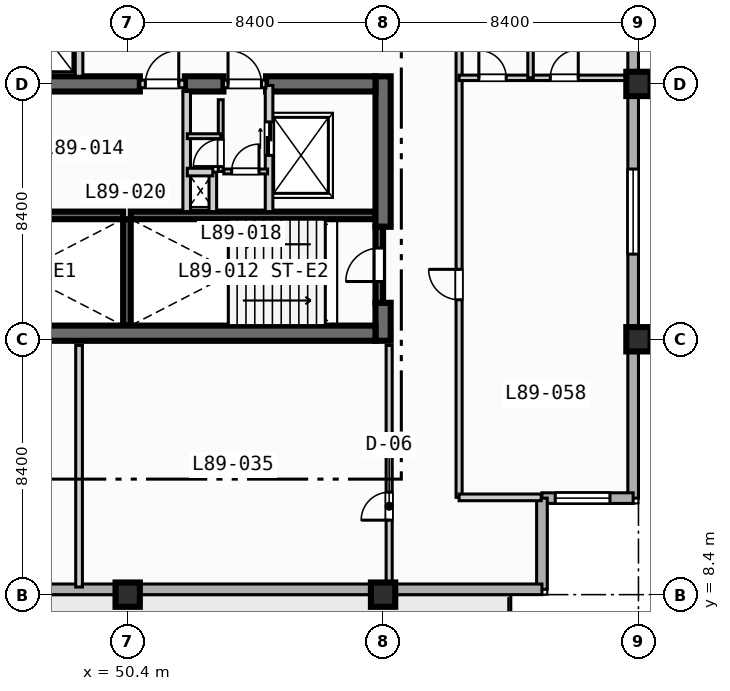
"""IFC4 building model, lengths in metres.
Left out: names, types, materials, properties, quantities, classifications, styles, units other than length and angle.
Written with IfcOpenShell. Run it as: python <this file> out.ifc"""

import sys

from ifc_helpers import new_model, si_unit, direction, frame, frame_2d, origin, origin_2d, place, context, subcontext, project, spatial, rectangle, extrude, element, fill, save


model = new_model("IFC4")
c1 = context("Model", 3, precision=1e-05, world=origin(), true_north=direction((0.0, 1.0)))
c2 = subcontext(c1, "Body", "Model", "MODEL_VIEW")
j1 = project(units=[si_unit("LENGTHUNIT", "METRE"), si_unit("PLANEANGLEUNIT", "RADIAN")], contexts=[c1])
p1 = place(None, origin())
s1 = spatial("IfcSite", under=j1, at=p1, CompositionType="ELEMENT")
p2 = place(p1, origin())
s2 = spatial("IfcBuilding", under=s1, at=p2, CompositionType="ELEMENT")
p3 = place(p2, frame((0.0, 0.0, 359.6)))
s3 = spatial("IfcBuildingStorey", under=s2, at=p3, CompositionType="ELEMENT", Elevation=359.6)
for number, where, z_axis, x_axis in (
    (1, (42.2, 20.875, 0.0), (0.0, 0.0, 1.0), (1.0, 0.0, 0.0)),
    (2, (50.5, 20.875, 0.0), (0.0, 0.0, 1.0), (1.0, 0.0, 0.0)),
):
    element("IfcWall", number, at=place(p3, frame(where, z_axis=z_axis, x_axis=x_axis)), inside=s3, PredefinedType="SOLIDWALL", context=c2, shape_type="SweptSolid", body=[
        extrude(rectangle(XDim=8.05, YDim=0.25, at=frame_2d((4.025, 0.0))), origin(), (0.0, 0.0, 1.0), 3.9),
    ])
p4 = place(p3, frame((50.375, 17.25, 0.0), z_axis=(0.0, 0.0, 1.0), x_axis=(0.0, 1.0, 0.0)))
e3 = element("IfcWall", 3, at=p4, inside=s3, PredefinedType="SOLIDWALL", context=c2, shape_type="SweptSolid", body=[
    extrude(rectangle(XDim=3.5, YDim=0.25, at=frame_2d((1.75, 0.0))), origin(), (0.0, 0.0, 1.0), 3.9),
])
p5 = place(p3, frame((58.8, 16.75, 0.0), z_axis=(0.0, 0.0, 1.0), x_axis=(0.0, 1.0, 0.0)))
e4 = element("IfcWall", 4, at=p5, inside=s3, PredefinedType="SHEAR", context=c2, shape_type="SweptSolid", body=[
    extrude(rectangle(XDim=1.25, YDim=0.5, at=frame_2d((0.625, 0.0))), origin(), (0.0, 0.0, 1.0), 3.9),
])
p6 = place(p3, frame((58.8, 20.5, 0.0), z_axis=(0.0, 0.0, 1.0), x_axis=(0.0, 1.0, 0.0)))
e5 = element("IfcWall", 5, at=p6, inside=s3, PredefinedType="SHEAR", context=c2, shape_type="SweptSolid", body=[
    extrude(rectangle(XDim=4.95, YDim=0.5, at=frame_2d((2.475, 0.0))), origin(), (0.0, 0.0, 1.0), 3.9),
])
p7 = place(p3, frame((42.2, 17.0, 0.0), z_axis=(0.0, 0.0, 1.0), x_axis=(1.0, 0.0, 0.0)))
e6 = element("IfcWall", 6, at=p7, inside=s3, PredefinedType="SHEAR", context=c2, shape_type="SweptSolid", body=[
    extrude(rectangle(XDim=16.35, YDim=0.5, at=frame_2d((8.175, 0.0))), origin(), (0.0, 0.0, 1.0), 3.9),
])
p8 = place(p3, frame((42.2, 25.2, 0.0), z_axis=(0.0, 0.0, 1.0), x_axis=(1.0, 0.0, 0.0)))
e7 = element("IfcWall", 7, at=p8, inside=s3, PredefinedType="SHEAR", context=c2, shape_type="SweptSolid", body=[
    extrude(rectangle(XDim=8.6, YDim=0.5, at=frame_2d((4.3, 0.0))), origin(), (0.0, 0.0, 1.0), 3.9),
])
p9 = place(p3, frame((52.28, 25.2, 0.0), z_axis=(0.0, 0.0, 1.0), x_axis=(1.0, 0.0, 0.0)))
e8 = element("IfcWall", 8, at=p9, inside=s3, PredefinedType="SHEAR", context=c2, shape_type="SweptSolid", body=[
    extrude(rectangle(XDim=1.27, YDim=0.5, at=frame_2d((0.635, 0.0))), origin(), (0.0, 0.0, 1.0), 3.9),
])
p10 = place(p3, frame((54.95, 25.2, 0.0), z_axis=(0.0, 0.0, 1.0), x_axis=(1.0, 0.0, 0.0)))
e9 = element("IfcWall", 9, at=p10, inside=s3, PredefinedType="SHEAR", context=c2, shape_type="SweptSolid", body=[
    extrude(rectangle(XDim=3.6, YDim=0.5, at=frame_2d((1.8, 0.0))), origin(), (0.0, 0.0, 1.0), 3.9),
])
for number, where, z_axis, x_axis in (
    (10, (50.4, 8.4, 0.0), (0.0, 0.0, 1.0), (1.0, 0.0, 0.0)),
    (11, (58.8, 8.4, 0.0), (0.0, 0.0, 1.0), (1.0, 0.0, 0.0)),
    (12, (67.2, 16.8, 0.0), (0.0, 0.0, 1.0), (1.0, 0.0, 0.0)),
    (13, (67.2, 25.2, 0.0), (0.0, 0.0, 1.0), (1.0, 0.0, 0.0)),
):
    element("IfcColumn", number, at=place(p3, frame(where, z_axis=z_axis, x_axis=x_axis)), inside=s3, PredefinedType="COLUMN", context=c2, shape_type="SweptSolid", body=[
        extrude(rectangle(XDim=0.8, YDim=0.8, at=origin_2d()), origin(), (0.0, 0.0, 1.0), 4.2),
    ])
p11 = place(p3, frame((67.025, 30.425, 0.0), z_axis=(0.0, 0.0, 1.0), x_axis=(0.0, -1.0, 0.0)))
e14 = element("IfcWall", 14, at=p11, inside=s3, PredefinedType="STANDARD", context=c2, shape_type="SweptSolid", body=[
    extrude(rectangle(XDim=18.85, YDim=0.35, at=frame_2d((9.425, 0.0))), origin(), (0.0, 0.0, 1.0), 3.3),
])
p12 = place(p11, frame((8.025, 0.0, 0.85)))
e15 = element("IfcOpeningElement", 15, at=p12, cuts=e14, PredefinedType="OPENING", context=c2, shape_type="SweptSolid", body=[
    extrude(rectangle(XDim=2.8, YDim=2.1, at=frame_2d((1.4, 1.05))), frame((0.0, 0.185, 0.0), z_axis=(0.0, -1.0, 0.0), x_axis=(1.0, 0.0, 0.0)), (0.0, 0.0, 1.0), 0.37),
])
p13 = place(p3, frame((67.025, 11.575, 0.0), z_axis=(0.0, 0.0, 1.0), x_axis=(-1.0, 0.0, 0.0)))
e16 = element("IfcWall", 16, at=p13, inside=s3, PredefinedType="STANDARD", context=c2, shape_type="SweptSolid", body=[
    extrude(rectangle(XDim=3.0, YDim=0.35, at=frame_2d((1.5, 0.0))), origin(), (0.0, 0.0, 1.0), 3.9),
])
p14 = place(p13, frame((0.762, 0.0, 0.85)))
e17 = element("IfcOpeningElement", 17, at=p14, cuts=e16, PredefinedType="OPENING", context=c2, shape_type="SweptSolid", body=[
    extrude(rectangle(XDim=1.8, YDim=1.8, at=frame_2d((0.9, 0.9))), frame((0.0, 0.185, 0.0), z_axis=(0.0, -1.0, 0.0), x_axis=(1.0, 0.0, 0.0)), (0.0, 0.0, 1.0), 0.37),
])
p15 = place(p3, frame((64.025, 11.575, 0.0), z_axis=(0.0, 0.0, 1.0), x_axis=(0.0, -1.0, 0.0)))
e18 = element("IfcWall", 18, at=p15, inside=s3, PredefinedType="STANDARD", context=c2, shape_type="SweptSolid", body=[
    extrude(rectangle(XDim=3.0, YDim=0.35, at=frame_2d((1.5, 0.0))), origin(), (0.0, 0.0, 1.0), 3.9),
])
p16 = place(p3, frame((64.025, 8.575, 0.0), z_axis=(0.0, 0.0, 1.0), x_axis=(-1.0, 0.0, 0.0)))
e19 = element("IfcWall", 19, at=p16, inside=s3, PredefinedType="STANDARD", context=c2, shape_type="SweptSolid", body=[
    extrude(rectangle(XDim=52.45, YDim=0.35, at=frame_2d((26.225, 0.0))), origin(), (0.0, 0.0, 1.0), 3.045),
])
p17 = place(p16, frame((34.925, 0.0, 0.0)))
e20 = element("IfcOpeningElement", 20, at=p17, cuts=e19, PredefinedType="OPENING", context=c2, shape_type="SweptSolid", body=[
    extrude(rectangle(XDim=1.4, YDim=2.2, at=frame_2d((0.7, 1.1))), frame((0.0, 0.185, 0.0), z_axis=(0.0, -1.0, 0.0), x_axis=(1.0, 0.0, 0.0)), (0.0, 0.0, 1.0), 0.37),
])
p18 = place(p16, frame((24.825, 0.0, 0.45)))
e21 = element("IfcOpeningElement", 21, at=p18, cuts=e19, PredefinedType="OPENING", context=c2, shape_type="SweptSolid", body=[
    extrude(rectangle(XDim=2.8, YDim=2.1, at=frame_2d((1.4, 1.05))), frame((0.0, 0.185, 0.0), z_axis=(0.0, -1.0, 0.0), x_axis=(1.0, 0.0, 0.0)), (0.0, 0.0, 1.0), 0.37),
])
p19 = place(p16, frame((16.425, 0.0, 0.45)))
e22 = element("IfcOpeningElement", 22, at=p19, cuts=e19, PredefinedType="OPENING", context=c2, shape_type="SweptSolid", body=[
    extrude(rectangle(XDim=2.8, YDim=2.1, at=frame_2d((1.4, 1.05))), frame((0.0, 0.185, 0.0), z_axis=(0.0, -1.0, 0.0), x_axis=(1.0, 0.0, 0.0)), (0.0, 0.0, 1.0), 0.37),
])
p20 = place(p16, frame((50.275, 0.0, 0.85)))
e23 = element("IfcOpeningElement", 23, at=p20, cuts=e19, PredefinedType="OPENING", context=c2, shape_type="SweptSolid", body=[
    extrude(rectangle(XDim=1.8, YDim=1.8, at=frame_2d((0.9, 0.9))), frame((0.0, 0.185, 0.0), z_axis=(0.0, -1.0, 0.0), x_axis=(1.0, 0.0, 0.0)), (0.0, 0.0, 1.0), 0.37),
])
p21 = place(p16, frame((44.875, 0.0, 0.85)))
e24 = element("IfcOpeningElement", 24, at=p21, cuts=e19, PredefinedType="OPENING", context=c2, shape_type="SweptSolid", body=[
    extrude(rectangle(XDim=1.8, YDim=1.8, at=frame_2d((0.9, 0.9))), frame((0.0, 0.185, 0.0), z_axis=(0.0, -1.0, 0.0), x_axis=(1.0, 0.0, 0.0)), (0.0, 0.0, 1.0), 0.37),
])
p22 = place(p16, frame((41.475, 0.0, 0.85)))
e25 = element("IfcOpeningElement", 25, at=p22, cuts=e19, PredefinedType="OPENING", context=c2, shape_type="SweptSolid", body=[
    extrude(rectangle(XDim=1.8, YDim=1.8, at=frame_2d((0.9, 0.9))), frame((0.0, 0.185, 0.0), z_axis=(0.0, -1.0, 0.0), x_axis=(1.0, 0.0, 0.0)), (0.0, 0.0, 1.0), 0.37),
])
p23 = place(p16, frame((32.475, 0.0, 0.85)))
e26 = element("IfcOpeningElement", 26, at=p23, cuts=e19, PredefinedType="OPENING", context=c2, shape_type="SweptSolid", body=[
    extrude(rectangle(XDim=1.8, YDim=1.8, at=frame_2d((0.9, 0.9))), frame((0.0, 0.185, 0.0), z_axis=(0.0, -1.0, 0.0), x_axis=(1.0, 0.0, 0.0)), (0.0, 0.0, 1.0), 0.37),
])
p24 = place(p3, frame((58.675, 18.0, 0.0), z_axis=(0.0, 0.0, 1.0), x_axis=(0.0, 1.0, 0.0)))
e27 = element("IfcWall", 27, at=p24, inside=s3, PredefinedType="SOLIDWALL", context=c2, shape_type="SweptSolid", body=[
    extrude(rectangle(XDim=2.5, YDim=0.25, at=frame_2d((1.25, 0.0))), origin(), (0.0, 0.0, 1.0), 3.9),
])
p25 = place(p24, frame((0.7, 0.0, 0.0)))
e28 = element("IfcOpeningElement", 28, at=p25, cuts=e27, PredefinedType="OPENING", context=c2, shape_type="SweptSolid", body=[
    extrude(rectangle(XDim=1.1, YDim=2.15, at=frame_2d((0.55, 1.075))), frame((0.0, 0.135, 0.0), z_axis=(0.0, -1.0, 0.0), x_axis=(1.0, 0.0, 0.0)), (0.0, 0.0, 1.0), 0.27),
])
p26 = place(p3, frame((50.8, 25.2, 0.0), z_axis=(0.0, 0.0, 1.0), x_axis=(1.0, 0.0, 0.0)))
e29 = element("IfcWall", 29, at=p26, inside=s3, PredefinedType="SOLIDWALL", context=c2, shape_type="SweptSolid", body=[
    extrude(rectangle(XDim=1.48, YDim=0.25, at=frame_2d((0.74, 0.0))), origin(), (0.0, 0.0, 1.0), 3.9),
])
p27 = place(p26, frame((0.18, 0.0, 0.0)))
e30 = element("IfcOpeningElement", 30, at=p27, cuts=e29, PredefinedType="OPENING", context=c2, shape_type="SweptSolid", body=[
    extrude(rectangle(XDim=1.1, YDim=2.15, at=frame_2d((0.55, 1.075))), frame((0.0, 0.135, 0.0), z_axis=(0.0, -1.0, 0.0), x_axis=(1.0, 0.0, 0.0)), (0.0, 0.0, 1.0), 0.27),
])
p28 = place(p3, frame((52.34, 21.0, 0.0), z_axis=(0.0, 0.0, 1.0), x_axis=(0.0, 1.0, 0.0)))
e31 = element("IfcWall", 31, at=p28, inside=s3, PredefinedType="SOLIDWALL", context=c2, shape_type="SweptSolid", body=[
    extrude(rectangle(XDim=3.95, YDim=0.25, at=frame_2d((1.975, 0.0))), origin(), (0.0, 0.0, 1.0), 3.9),
])
p29 = place(p3, frame((55.05, 21.0, 0.0), z_axis=(0.0, 0.0, 1.0), x_axis=(0.0, 1.0, 0.0)))
e32 = element("IfcWall", 32, at=p29, inside=s3, PredefinedType="SOLIDWALL", context=c2, shape_type="SweptSolid", body=[
    extrude(rectangle(XDim=4.15, YDim=0.25, at=frame_2d((2.075, 0.0))), origin(), (0.0, 0.0, 1.0), 3.9),
])
p30 = place(p29, frame((1.85, 0.0, 0.0)))
e33 = element("IfcOpeningElement", 33, at=p30, cuts=e32, PredefinedType="OPENING", context=c2, shape_type="SweptSolid", body=[
    extrude(rectangle(XDim=1.1, YDim=2.15, at=frame_2d((0.55, 1.075))), frame((0.0, 0.135, 0.0), z_axis=(0.0, -1.0, 0.0), x_axis=(1.0, 0.0, 0.0)), (0.0, 0.0, 1.0), 0.27),
])
p31 = place(p3, frame((53.55, 25.2, 0.0), z_axis=(0.0, 0.0, 1.0), x_axis=(1.0, 0.0, 0.0)))
e34 = element("IfcWall", 34, at=p31, inside=s3, PredefinedType="SOLIDWALL", context=c2, shape_type="SweptSolid", body=[
    extrude(rectangle(XDim=1.4, YDim=0.25, at=frame_2d((0.7, 0.0))), origin(), (0.0, 0.0, 1.0), 3.9),
])
p32 = place(p31, frame((0.15, 0.0, 0.0)))
e35 = element("IfcOpeningElement", 35, at=p32, cuts=e34, PredefinedType="OPENING", context=c2, shape_type="SweptSolid", body=[
    extrude(rectangle(XDim=1.1, YDim=2.15, at=frame_2d((0.55, 1.075))), frame((0.0, 0.135, 0.0), z_axis=(0.0, -1.0, 0.0), x_axis=(1.0, 0.0, 0.0)), (0.0, 0.0, 1.0), 0.27),
])
p33 = place(p3, frame((53.2, 21.0, 0.0), z_axis=(0.0, 0.0, 1.0), x_axis=(0.0, 1.0, 0.0)))
e36 = element("IfcWall", 36, at=p33, inside=s3, PredefinedType="SOLIDWALL", context=c2, shape_type="SweptSolid", body=[
    extrude(rectangle(XDim=1.3, YDim=0.25, at=frame_2d((0.65, 0.0))), origin(), (0.0, 0.0, 1.0), 3.9),
])
p34 = place(p3, frame((52.36, 22.3, 0.0), z_axis=(0.0, 0.0, 1.0), x_axis=(1.0, 0.0, 0.0)))
e37 = element("IfcWall", 37, at=p34, inside=s3, PredefinedType="SOLIDWALL", context=c2, shape_type="SweptSolid", body=[
    extrude(rectangle(XDim=0.84, YDim=0.25, at=frame_2d((0.42, 0.0))), origin(), (0.0, 0.0, 1.0), 3.9),
])
p35 = place(p3, frame((53.56, 22.32, 0.0), z_axis=(0.0, 0.0, 1.0), x_axis=(1.0, 0.0, 0.0)))
e38 = element("IfcWall", 38, at=p35, inside=s3, PredefinedType="PARTITIONING", context=c2, shape_type="SweptSolid", body=[
    extrude(rectangle(XDim=1.44, YDim=0.16, at=frame_2d((0.72, 0.0))), origin(), (0.0, 0.0, 1.0), 3.9),
])
p36 = place(p35, frame((0.26, 0.0, 0.0)))
e39 = element("IfcOpeningElement", 39, at=p36, cuts=e38, PredefinedType="OPENING", context=c2, shape_type="SweptSolid", body=[
    extrude(rectangle(XDim=0.9, YDim=2.1, at=frame_2d((0.45, 1.05))), frame((0.0, 0.09, 0.0), z_axis=(0.0, -1.0, 0.0), x_axis=(1.0, 0.0, 0.0)), (0.0, 0.0, 1.0), 0.18),
])
p37 = place(p3, frame((53.46, 22.32, 0.0), z_axis=(0.0, 0.0, 1.0), x_axis=(0.0, 1.0, 0.0)))
e40 = element("IfcWall", 40, at=p37, inside=s3, PredefinedType="PARTITIONING", context=c2, shape_type="SweptSolid", body=[
    extrude(rectangle(XDim=2.36, YDim=0.16, at=frame_2d((1.18, 0.0))), origin(), (0.0, 0.0, 1.0), 3.9),
])
p38 = place(p37, frame((0.16, 0.0, 0.0)))
e41 = element("IfcOpeningElement", 41, at=p38, cuts=e40, PredefinedType="OPENING", context=c2, shape_type="SweptSolid", body=[
    extrude(rectangle(XDim=0.9, YDim=2.1, at=frame_2d((0.45, 1.05))), frame((0.0, 0.09, 0.0), z_axis=(0.0, -1.0, 0.0), x_axis=(1.0, 0.0, 0.0)), (0.0, 0.0, 1.0), 0.18),
])
p39 = place(p3, frame((52.36, 23.48, 0.0), z_axis=(0.0, 0.0, 1.0), x_axis=(1.0, 0.0, 0.0)))
e42 = element("IfcWall", 42, at=p39, inside=s3, PredefinedType="PARTITIONING", context=c2, shape_type="SweptSolid", body=[
    extrude(rectangle(XDim=1.1, YDim=0.16, at=frame_2d((0.55, 0.0))), origin(), (0.0, 0.0, 1.0), 3.9),
])
p40 = place(p3, frame((48.8, 25.45, 0.0), z_axis=(0.0, 0.0, 1.0), x_axis=(0.0, 1.0, 0.0)))
e43 = element("IfcWall", 43, at=p40, inside=s3, PredefinedType="SOLIDWALL", context=c2, shape_type="SweptSolid", body=[
    extrude(rectangle(XDim=2.325, YDim=0.25, at=frame_2d((1.163, 0.0))), origin(), (0.0, 0.0, 1.0), 3.9),
])
p41 = place(p3, frame((59.0, 8.65, 0.0), z_axis=(0.0, 0.0, 1.0), x_axis=(0.0, 1.0, 0.0)))
e44 = element("IfcWall", 44, at=p41, inside=s3, PredefinedType="PARTITIONING", context=c2, shape_type="SweptSolid", body=[
    extrude(rectangle(XDim=7.95, YDim=0.2, at=frame_2d((3.975, 0.0))), origin(), (0.0, 0.0, 1.0), 3.3),
])
p42 = place(p41, frame((2.2, 0.0, 0.0)))
e45 = element("IfcOpeningElement", 45, at=p42, cuts=e44, PredefinedType="OPENING", context=c2, shape_type="SweptSolid", body=[
    extrude(rectangle(XDim=0.92, YDim=2.1, at=frame_2d((0.46, 1.05))), frame((0.0, 0.11, 0.0), z_axis=(0.0, -1.0, 0.0), x_axis=(1.0, 0.0, 0.0)), (0.0, 0.0, 1.0), 0.22),
])
p43 = place(p3, frame((48.8, 8.65, 0.0), z_axis=(0.0, 0.0, 1.0), x_axis=(0.0, 1.0, 0.0)))
e46 = element("IfcWall", 46, at=p43, inside=s3, PredefinedType="PARTITIONING", context=c2, shape_type="SweptSolid", body=[
    extrude(rectangle(XDim=7.95, YDim=0.22, at=frame_2d((3.975, 0.0))), origin(), (0.0, 0.0, 1.0), 3.9),
])
p44 = place(p3, frame((61.3, 11.6, 0.0), z_axis=(0.0, 0.0, 1.0), x_axis=(0.0, 1.0, 0.0)))
e47 = element("IfcWall", 47, at=p44, inside=s3, PredefinedType="PARTITIONING", context=c2, shape_type="SweptSolid", body=[
    extrude(rectangle(XDim=18.8, YDim=0.2, at=frame_2d((9.4, 0.0))), origin(), (0.0, 0.0, 1.0), 3.9),
])
p45 = place(p44, frame((6.5, 0.0, 0.0)))
e48 = element("IfcOpeningElement", 48, at=p45, cuts=e47, PredefinedType="OPENING", context=c2, shape_type="SweptSolid", body=[
    extrude(rectangle(XDim=1.0, YDim=2.15, at=frame_2d((0.5, 1.075))), frame((0.0, 0.11, 0.0), z_axis=(0.0, -1.0, 0.0), x_axis=(1.0, 0.0, 0.0)), (0.0, 0.0, 1.0), 0.22),
])
p46 = place(p3, frame((61.3, 25.4, 0.0), z_axis=(0.0, 0.0, 1.0), x_axis=(1.0, 0.0, 0.0)))
e49 = element("IfcWall", 49, at=p46, inside=s3, PredefinedType="PLUMBINGWALL", context=c2, shape_type="SweptSolid", body=[
    extrude(rectangle(XDim=5.5, YDim=0.18, at=frame_2d((2.75, 0.0))), origin(), (0.0, 0.0, 1.0), 2.9),
])
p47 = place(p46, frame((0.65, 0.0, 0.0)))
e50 = element("IfcOpeningElement", 50, at=p47, cuts=e49, PredefinedType="OPENING", context=c2, shape_type="SweptSolid", body=[
    extrude(rectangle(XDim=0.9, YDim=2.1, at=frame_2d((0.45, 1.05))), frame((0.0, 0.1, 0.0), z_axis=(0.0, -1.0, 0.0), x_axis=(1.0, 0.0, 0.0)), (0.0, 0.0, 1.0), 0.2),
])
p48 = place(p46, frame((3.0, 0.0, 0.0)))
e51 = element("IfcOpeningElement", 51, at=p48, cuts=e49, PredefinedType="OPENING", context=c2, shape_type="SweptSolid", body=[
    extrude(rectangle(XDim=0.92, YDim=2.1, at=frame_2d((0.46, 1.05))), frame((0.0, 0.1, 0.0), z_axis=(0.0, -1.0, 0.0), x_axis=(1.0, 0.0, 0.0)), (0.0, 0.0, 1.0), 0.2),
])
p49 = place(p3, frame((63.65, 25.4, 0.0), z_axis=(0.0, 0.0, 1.0), x_axis=(0.0, 1.0, 0.0)))
e52 = element("IfcWall", 52, at=p49, inside=s3, PredefinedType="PLUMBINGWALL", context=c2, shape_type="SweptSolid", body=[
    extrude(rectangle(XDim=5.0, YDim=0.18, at=frame_2d((2.5, 0.0))), origin(), (0.0, 0.0, 1.0), 3.9),
])
p50 = place(p3, frame((61.3, 11.6, 0.0), z_axis=(0.0, 0.0, 1.0), x_axis=(1.0, 0.0, 0.0)))
e53 = element("IfcWall", 53, at=p50, inside=s3, PredefinedType="PARTITIONING", context=c2, shape_type="SweptSolid", body=[
    extrude(rectangle(XDim=2.7, YDim=0.22, at=frame_2d((1.35, 0.0))), origin(), (0.0, 0.0, 1.0), 3.9),
])
p51 = place(p12, origin())
e54 = element("IfcWindow", 54, at=p51, inside=s3, PartitioningType="SINGLE_PANEL", PredefinedType="WINDOW", context=c2, shape_type="SweptSolid", body=[
    extrude(rectangle(XDim=2.8, YDim=2.1, at=frame_2d((1.4, 1.05))), frame((0.0, 0.03, 0.0), z_axis=(0.0, -1.0, 0.0), x_axis=(1.0, 0.0, 0.0)), (0.0, 0.0, 1.0), 0.06),
])
fill(e15, e54)
p52 = place(p14, origin())
e55 = element("IfcWindow", 55, at=p52, inside=s3, PartitioningType="SINGLE_PANEL", PredefinedType="WINDOW", context=c2, shape_type="SweptSolid", body=[
    extrude(rectangle(XDim=1.8, YDim=1.8, at=frame_2d((0.9, 0.9))), frame((0.0, 0.03, 0.0), z_axis=(0.0, -1.0, 0.0), x_axis=(1.0, 0.0, 0.0)), (0.0, 0.0, 1.0), 0.06),
])
fill(e17, e55)
p53 = place(p25, origin())
e56 = element("IfcDoor", 56, at=p53, inside=s3, OperationType="SINGLE_SWING_LEFT", PredefinedType="DOOR", context=c2, shape_type="SweptSolid", body=[
    extrude(rectangle(XDim=1.1, YDim=2.15, at=frame_2d((0.55, 1.075))), frame((0.0, 0.025, 0.0), z_axis=(0.0, -1.0, 0.0), x_axis=(1.0, 0.0, 0.0)), (0.0, 0.0, 1.0), 0.05),
])
fill(e28, e56)
p54 = place(p27, origin())
e57 = element("IfcDoor", 57, at=p54, inside=s3, OperationType="SINGLE_SWING_RIGHT", PredefinedType="DOOR", context=c2, shape_type="SweptSolid", body=[
    extrude(rectangle(XDim=1.1, YDim=2.15, at=frame_2d((0.55, 1.075))), frame((0.0, 0.025, 0.0), z_axis=(0.0, -1.0, 0.0), x_axis=(1.0, 0.0, 0.0)), (0.0, 0.0, 1.0), 0.05),
])
fill(e30, e57)
p55 = place(p30, origin())
e58 = element("IfcDoor", 58, at=p55, inside=s3, OperationType="SLIDING_TO_LEFT", PredefinedType="DOOR", context=c2, shape_type="SweptSolid", body=[
    extrude(rectangle(XDim=1.1, YDim=2.15, at=frame_2d((0.55, 1.075))), frame((0.0, 0.025, 0.0), z_axis=(0.0, -1.0, 0.0), x_axis=(1.0, 0.0, 0.0)), (0.0, 0.0, 1.0), 0.05),
])
fill(e33, e58)
p56 = place(p32, origin())
e59 = element("IfcDoor", 59, at=p56, inside=s3, OperationType="SINGLE_SWING_LEFT", PredefinedType="DOOR", context=c2, shape_type="SweptSolid", body=[
    extrude(rectangle(XDim=1.1, YDim=2.15, at=frame_2d((0.55, 1.075))), frame((0.0, 0.025, 0.0), z_axis=(0.0, -1.0, 0.0), x_axis=(1.0, 0.0, 0.0)), (0.0, 0.0, 1.0), 0.05),
])
fill(e35, e59)
p57 = place(p36, origin())
e60 = element("IfcDoor", 60, at=p57, inside=s3, OperationType="SINGLE_SWING_RIGHT", PredefinedType="DOOR", context=c2, shape_type="SweptSolid", body=[
    extrude(rectangle(XDim=0.9, YDim=2.1, at=frame_2d((0.45, 1.05))), frame((0.0, 0.025, 0.0), z_axis=(0.0, -1.0, 0.0), x_axis=(1.0, 0.0, 0.0)), (0.0, 0.0, 1.0), 0.05),
])
fill(e39, e60)
p58 = place(p38, origin())
e61 = element("IfcDoor", 61, at=p58, inside=s3, OperationType="SINGLE_SWING_LEFT", PredefinedType="DOOR", context=c2, shape_type="SweptSolid", body=[
    extrude(rectangle(XDim=0.9, YDim=2.1, at=frame_2d((0.45, 1.05))), frame((0.0, 0.025, 0.0), z_axis=(0.0, -1.0, 0.0), x_axis=(1.0, 0.0, 0.0)), (0.0, 0.0, 1.0), 0.05),
])
fill(e41, e61)
p59 = place(p42, origin())
e62 = element("IfcDoor", 62, at=p59, inside=s3, OperationType="SINGLE_SWING_LEFT", PredefinedType="DOOR", context=c2, shape_type="SweptSolid", body=[
    extrude(rectangle(XDim=0.92, YDim=2.1, at=frame_2d((0.46, 1.05))), frame((0.0, 0.025, 0.0), z_axis=(0.0, -1.0, 0.0), x_axis=(1.0, 0.0, 0.0)), (0.0, 0.0, 1.0), 0.05),
])
fill(e45, e62)
p60 = place(p45, origin())
e63 = element("IfcDoor", 63, at=p60, inside=s3, OperationType="SINGLE_SWING_RIGHT", PredefinedType="DOOR", context=c2, shape_type="SweptSolid", body=[
    extrude(rectangle(XDim=1.0, YDim=2.15, at=frame_2d((0.5, 1.075))), frame((0.0, 0.025, 0.0), z_axis=(0.0, -1.0, 0.0), x_axis=(1.0, 0.0, 0.0)), (0.0, 0.0, 1.0), 0.05),
])
fill(e48, e63)
p61 = place(p47, origin())
e64 = element("IfcDoor", 64, at=p61, inside=s3, OperationType="SINGLE_SWING_LEFT", PredefinedType="DOOR", context=c2, shape_type="SweptSolid", body=[
    extrude(rectangle(XDim=0.9, YDim=2.1, at=frame_2d((0.45, 1.05))), frame((0.0, 0.025, 0.0), z_axis=(0.0, -1.0, 0.0), x_axis=(1.0, 0.0, 0.0)), (0.0, 0.0, 1.0), 0.05),
])
fill(e50, e64)
p62 = place(p48, origin())
e65 = element("IfcDoor", 65, at=p62, inside=s3, OperationType="SINGLE_SWING_RIGHT", PredefinedType="DOOR", context=c2, shape_type="SweptSolid", body=[
    extrude(rectangle(XDim=0.92, YDim=2.1, at=frame_2d((0.46, 1.05))), frame((0.0, 0.025, 0.0), z_axis=(0.0, -1.0, 0.0), x_axis=(1.0, 0.0, 0.0)), (0.0, 0.0, 1.0), 0.05),
])
fill(e51, e65)
save(model, sys.argv[1])
